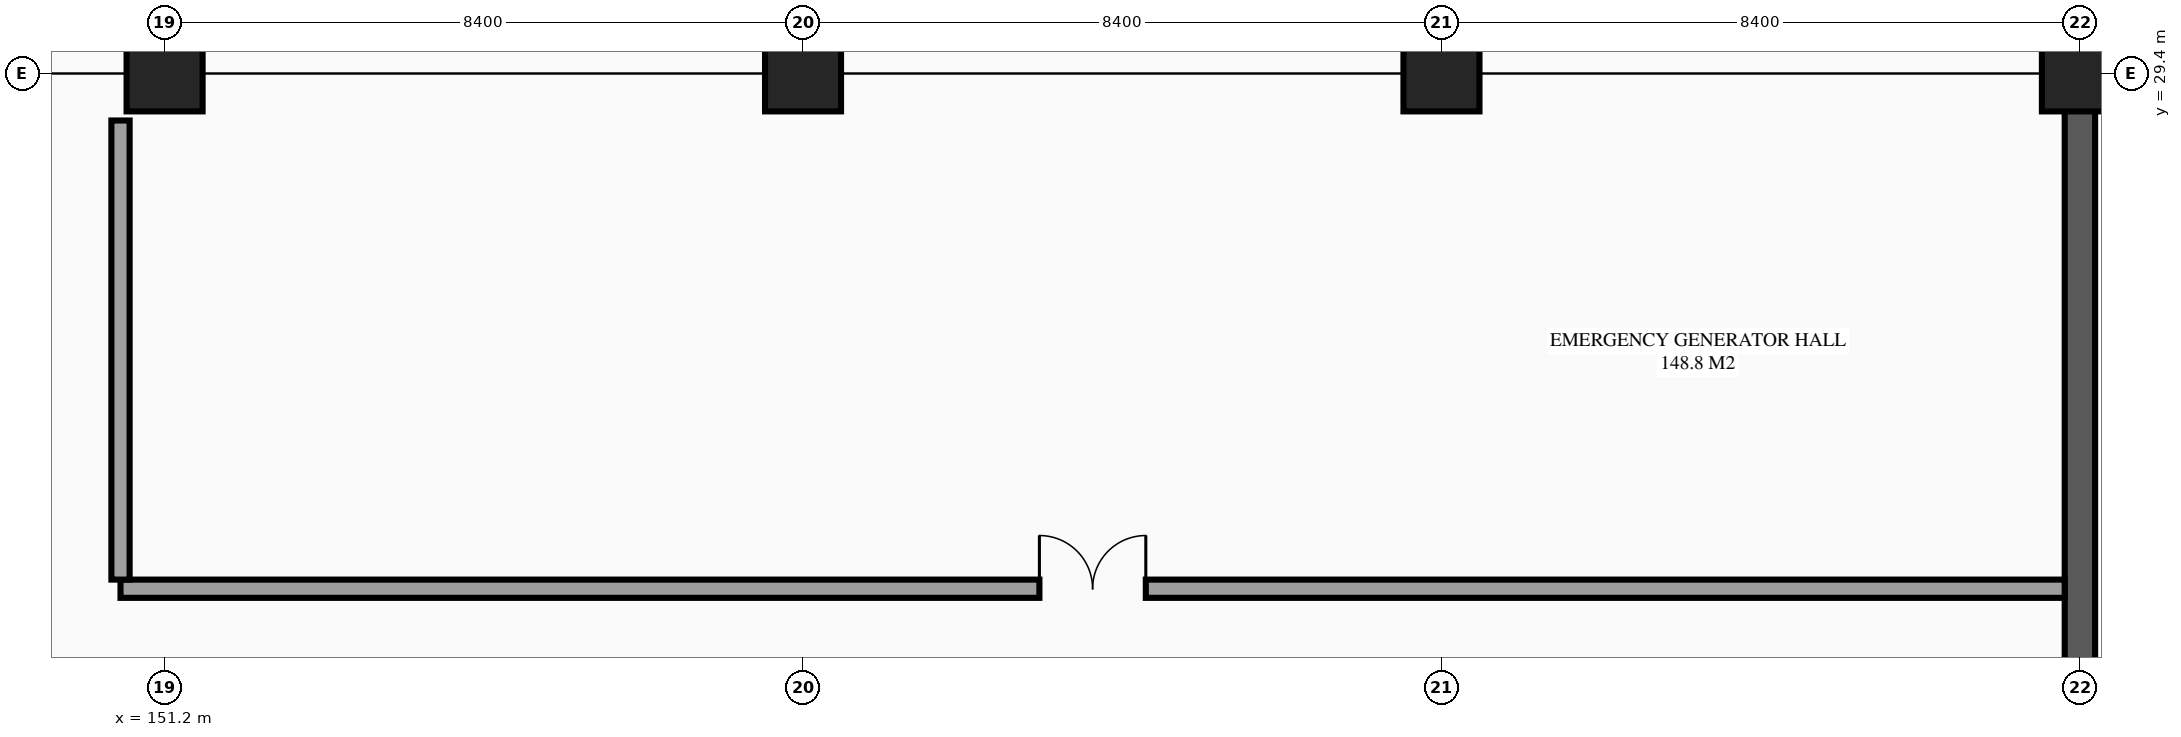
"""IFC4 building model, lengths in metres.
Left out: names, types, materials, properties, quantities, classifications, styles, units other than length and angle.
Written with IfcOpenShell. Run it as: python <this file> out.ifc"""

import sys

from ifc_helpers import new_model, si_unit, direction, frame, frame_2d, origin, origin_2d, place, context, subcontext, project, spatial, rectangle, extrude, element, fill, save


model = new_model("IFC4")
c1 = context("Model", 3, precision=1e-05, world=origin(), true_north=direction((0.0, 1.0)))
c2 = subcontext(c1, "Body", "Model", "MODEL_VIEW")
j1 = project(units=[si_unit("LENGTHUNIT", "METRE"), si_unit("PLANEANGLEUNIT", "RADIAN")], contexts=[c1])
p1 = place(None, origin())
s1 = spatial("IfcSite", under=j1, at=p1, CompositionType="ELEMENT")
p2 = place(p1, origin())
s2 = spatial("IfcBuilding", under=s1, at=p2, CompositionType="ELEMENT")
p3 = place(p2, frame((0.0, 0.0, -4.5)))
s3 = spatial("IfcBuildingStorey", under=s2, at=p3, CompositionType="ELEMENT", Elevation=-4.5)
for number, where, z_axis, x_axis in (
    (1, (151.2, 29.4, -0.36), (0.0, 0.0, 1.0), (1.0, 0.0, 0.0)),
    (2, (159.6, 29.4, -0.36), (0.0, 0.0, 1.0), (1.0, 0.0, 0.0)),
    (3, (168.0, 29.4, -0.36), (0.0, 0.0, 1.0), (1.0, 0.0, 0.0)),
    (4, (176.4, 29.4, -0.36), (0.0, 0.0, 1.0), (1.0, 0.0, 0.0)),
):
    element("IfcColumn", number, at=place(p3, frame(where, z_axis=z_axis, x_axis=x_axis)), inside=s3, PredefinedType="COLUMN", context=c2, shape_type="SweptSolid", body=[
        extrude(rectangle(XDim=1.0, YDim=1.0, at=origin_2d()), origin(), (0.0, 0.0, 1.0), 4.86),
    ])
p4 = place(p3, frame((176.4, 4.2, -0.36), z_axis=(0.0, 0.0, 1.0), x_axis=(0.0, 1.0, 0.0)))
e5 = element("IfcWall", 5, at=p4, inside=s3, PredefinedType="STANDARD", context=c2, shape_type="SweptSolid", body=[
    extrude(rectangle(XDim=75.6, YDim=0.4, at=frame_2d((37.8, 0.0))), origin(), (0.0, 0.0, 1.0), 4.86),
])
p5 = place(p3, frame((150.62, 22.62, 0.0), z_axis=(0.0, 0.0, 1.0), x_axis=(1.0, 0.0, 0.0)))
e6 = element("IfcWall", 6, at=p5, inside=s3, PredefinedType="PARTITIONING", context=c2, shape_type="SweptSolid", body=[
    extrude(rectangle(XDim=25.58, YDim=0.24, at=frame_2d((12.79, 0.0))), origin(), (0.0, 0.0, 1.0), 4.175),
])
p6 = place(p5, frame((12.09, 0.0, 0.0)))
e7 = element("IfcOpeningElement", 7, at=p6, cuts=e6, PredefinedType="OPENING", context=c2, shape_type="SweptSolid", body=[
    extrude(rectangle(XDim=1.4, YDim=2.2, at=frame_2d((0.7, 1.1))), frame((0.0, 0.13, 0.0), z_axis=(0.0, -1.0, 0.0), x_axis=(1.0, 0.0, 0.0)), (0.0, 0.0, 1.0), 0.26),
])
p7 = place(p3, frame((150.62, 22.74, 0.0), z_axis=(0.0, 0.0, 1.0), x_axis=(0.0, 1.0, 0.0)))
e8 = element("IfcWall", 8, at=p7, inside=s3, PredefinedType="PARTITIONING", context=c2, shape_type="SweptSolid", body=[
    extrude(rectangle(XDim=6.04, YDim=0.24, at=frame_2d((3.02, 0.0))), origin(), (0.0, 0.0, 1.0), 4.175),
])
p8 = place(p6, origin())
e9 = element("IfcDoor", 9, at=p8, inside=s3, OperationType="DOUBLE_DOOR_SINGLE_SWING", PredefinedType="DOOR", context=c2, shape_type="SweptSolid", body=[
    extrude(rectangle(XDim=1.4, YDim=2.2, at=frame_2d((0.7, 1.1))), frame((0.0, 0.025, 0.0), z_axis=(0.0, -1.0, 0.0), x_axis=(1.0, 0.0, 0.0)), (0.0, 0.0, 1.0), 0.05),
])
fill(e7, e9)
save(model, sys.argv[1])
